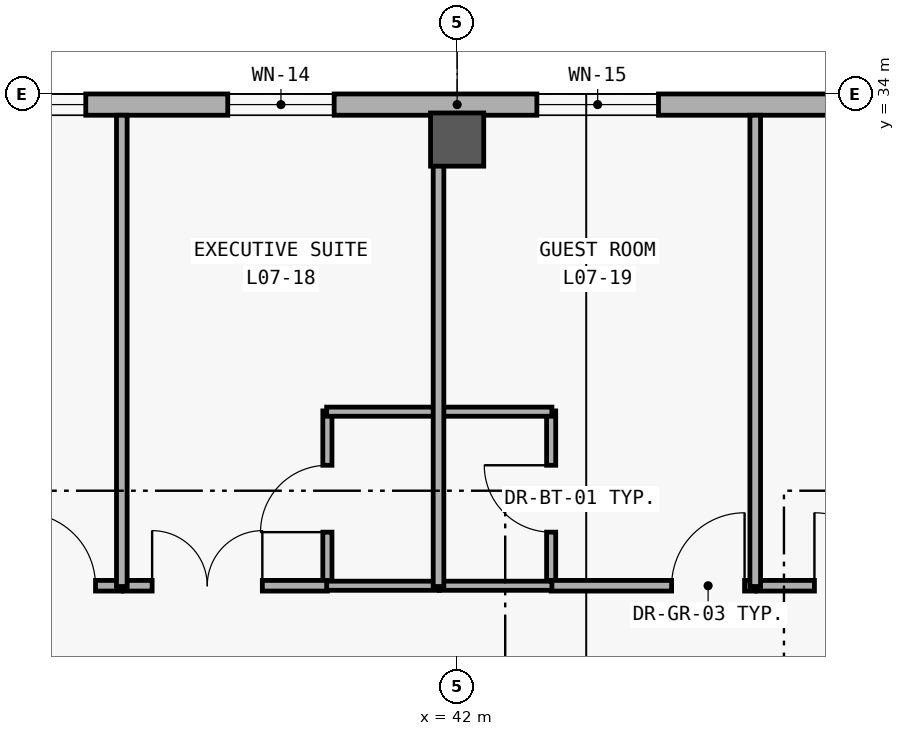
"""IFC4 building model, lengths in metres.
Left out: names, types, materials, properties, quantities, classifications, styles, units other than length and angle.
Written with IfcOpenShell. Run it as: python <this file> out.ifc"""

import sys

from ifc_helpers import new_model, si_unit, direction, frame, frame_2d, origin, origin_2d, place, context, subcontext, project, spatial, rectangle, extrude, element, fill, save


model = new_model("IFC4")
c1 = context("Model", 3, precision=1e-05, world=origin(), true_north=direction((0.0, 1.0)))
c2 = subcontext(c1, "Body", "Model", "MODEL_VIEW")
j1 = project(units=[si_unit("LENGTHUNIT", "METRE"), si_unit("PLANEANGLEUNIT", "RADIAN")], contexts=[c1])
p1 = place(None, origin())
s1 = spatial("IfcSite", under=j1, at=p1, CompositionType="ELEMENT")
p2 = place(p1, origin())
s2 = spatial("IfcBuilding", under=s1, at=p2, CompositionType="ELEMENT")
p3 = place(p2, frame((0.0, 0.0, 30.0)))
s3 = spatial("IfcBuildingStorey", under=s2, at=p3, CompositionType="ELEMENT", Elevation=30.0)
p4 = place(p3, frame((42.0, 33.4, 0.0), z_axis=(0.0, 0.0, 1.0), x_axis=(1.0, 0.0, 0.0)))
e1 = element("IfcColumn", 1, at=p4, inside=s3, PredefinedType="COLUMN", context=c2, shape_type="SweptSolid", body=[
    extrude(rectangle(XDim=0.7, YDim=0.7, at=origin_2d()), origin(), (0.0, 0.0, 1.0), 3.6),
])
p5 = place(p3, frame((8.68, 33.86, 0.0), z_axis=(0.0, 0.0, 1.0), x_axis=(1.0, 0.0, 0.0)))
e2 = element("IfcWall", 2, at=p5, inside=s3, PredefinedType="SOLIDWALL", context=c2, shape_type="SweptSolid", body=[
    extrude(rectangle(XDim=66.64, YDim=0.28, at=frame_2d((33.32, 0.0))), origin(), (0.0, 0.0, 1.0), 3.34),
])
p6 = place(p5, frame((5.195, 0.0, 0.85)))
e3 = element("IfcOpeningElement", 3, at=p6, cuts=e2, PredefinedType="OPENING", context=c2, shape_type="SweptSolid", body=[
    extrude(rectangle(XDim=2.0, YDim=1.65, at=frame_2d((1.0, 0.825))), frame((0.0, 0.15, 0.0), z_axis=(0.0, -1.0, 0.0), x_axis=(1.0, 0.0, 0.0)), (0.0, 0.0, 1.0), 0.3),
])
p7 = place(p5, frame((13.209, 0.0, 0.85)))
e4 = element("IfcOpeningElement", 4, at=p7, cuts=e2, PredefinedType="OPENING", context=c2, shape_type="SweptSolid", body=[
    extrude(rectangle(XDim=2.25, YDim=1.75, at=frame_2d((1.125, 0.875))), frame((0.0, 0.15, 0.0), z_axis=(0.0, -1.0, 0.0), x_axis=(1.0, 0.0, 0.0)), (0.0, 0.0, 1.0), 0.3),
])
p8 = place(p5, frame((17.226, 0.0, 0.85)))
e5 = element("IfcOpeningElement", 5, at=p8, cuts=e2, PredefinedType="OPENING", context=c2, shape_type="SweptSolid", body=[
    extrude(rectangle(XDim=2.55, YDim=1.8, at=frame_2d((1.275, 0.9))), frame((0.0, 0.15, 0.0), z_axis=(0.0, -1.0, 0.0), x_axis=(1.0, 0.0, 0.0)), (0.0, 0.0, 1.0), 0.3),
])
p9 = place(p5, frame((21.242, 0.0, 0.85)))
e6 = element("IfcOpeningElement", 6, at=p9, cuts=e2, PredefinedType="OPENING", context=c2, shape_type="SweptSolid", body=[
    extrude(rectangle(XDim=2.85, YDim=1.85, at=frame_2d((1.425, 0.925))), frame((0.0, 0.15, 0.0), z_axis=(0.0, -1.0, 0.0), x_axis=(1.0, 0.0, 0.0)), (0.0, 0.0, 1.0), 0.3),
])
p10 = place(p5, frame((25.234, 0.0, 0.85)))
e7 = element("IfcOpeningElement", 7, at=p10, cuts=e2, PredefinedType="OPENING", context=c2, shape_type="SweptSolid", body=[
    extrude(rectangle(XDim=3.2, YDim=1.95, at=frame_2d((1.6, 0.975))), frame((0.0, 0.15, 0.0), z_axis=(0.0, -1.0, 0.0), x_axis=(1.0, 0.0, 0.0)), (0.0, 0.0, 1.0), 0.3),
])
p11 = place(p5, frame((30.302, 0.0, 0.85)))
e8 = element("IfcOpeningElement", 8, at=p11, cuts=e2, PredefinedType="OPENING", context=c2, shape_type="SweptSolid", body=[
    extrude(rectangle(XDim=1.4, YDim=1.6, at=frame_2d((0.7, 0.8))), frame((0.0, 0.15, 0.0), z_axis=(0.0, -1.0, 0.0), x_axis=(1.0, 0.0, 0.0)), (0.0, 0.0, 1.0), 0.3),
])
p12 = place(p5, frame((34.369, 0.0, 0.85)))
e9 = element("IfcOpeningElement", 9, at=p12, cuts=e2, PredefinedType="OPENING", context=c2, shape_type="SweptSolid", body=[
    extrude(rectangle(XDim=1.6, YDim=1.6, at=frame_2d((0.8, 0.8))), frame((0.0, 0.15, 0.0), z_axis=(0.0, -1.0, 0.0), x_axis=(1.0, 0.0, 0.0)), (0.0, 0.0, 1.0), 0.3),
])
p13 = place(p5, frame((38.435, 0.0, 0.85)))
e10 = element("IfcOpeningElement", 10, at=p13, cuts=e2, PredefinedType="OPENING", context=c2, shape_type="SweptSolid", body=[
    extrude(rectangle(XDim=1.8, YDim=1.6, at=frame_2d((0.9, 0.8))), frame((0.0, 0.15, 0.0), z_axis=(0.0, -1.0, 0.0), x_axis=(1.0, 0.0, 0.0)), (0.0, 0.0, 1.0), 0.3),
])
p14 = place(p5, frame((42.502, 0.0, 0.85)))
e11 = element("IfcOpeningElement", 11, at=p14, cuts=e2, PredefinedType="OPENING", context=c2, shape_type="SweptSolid", body=[
    extrude(rectangle(XDim=2.0, YDim=1.65, at=frame_2d((1.0, 0.825))), frame((0.0, 0.15, 0.0), z_axis=(0.0, -1.0, 0.0), x_axis=(1.0, 0.0, 0.0)), (0.0, 0.0, 1.0), 0.3),
])
p15 = place(p5, frame((46.569, 0.0, 0.85)))
e12 = element("IfcOpeningElement", 12, at=p15, cuts=e2, PredefinedType="OPENING", context=c2, shape_type="SweptSolid", body=[
    extrude(rectangle(XDim=2.2, YDim=1.65, at=frame_2d((1.1, 0.825))), frame((0.0, 0.15, 0.0), z_axis=(0.0, -1.0, 0.0), x_axis=(1.0, 0.0, 0.0)), (0.0, 0.0, 1.0), 0.3),
])
p16 = place(p5, frame((50.536, 0.0, 0.85)))
e13 = element("IfcOpeningElement", 13, at=p16, cuts=e2, PredefinedType="OPENING", context=c2, shape_type="SweptSolid", body=[
    extrude(rectangle(XDim=2.6, YDim=2.2, at=frame_2d((1.3, 1.1))), frame((0.0, 0.15, 0.0), z_axis=(0.0, -1.0, 0.0), x_axis=(1.0, 0.0, 0.0)), (0.0, 0.0, 1.0), 0.3),
])
p17 = place(p5, frame((54.453, 0.0, 0.85)))
e14 = element("IfcOpeningElement", 14, at=p17, cuts=e2, PredefinedType="OPENING", context=c2, shape_type="SweptSolid", body=[
    extrude(rectangle(XDim=3.1, YDim=2.2, at=frame_2d((1.55, 1.1))), frame((0.0, 0.15, 0.0), z_axis=(0.0, -1.0, 0.0), x_axis=(1.0, 0.0, 0.0)), (0.0, 0.0, 1.0), 0.3),
])
p18 = place(p5, frame((59.545, 0.0, 0.85)))
e15 = element("IfcOpeningElement", 15, at=p18, cuts=e2, PredefinedType="OPENING", context=c2, shape_type="SweptSolid", body=[
    extrude(rectangle(XDim=1.25, YDim=1.45, at=frame_2d((0.625, 0.725))), frame((0.0, 0.15, 0.0), z_axis=(0.0, -1.0, 0.0), x_axis=(1.0, 0.0, 0.0)), (0.0, 0.0, 1.0), 0.3),
])
p19 = place(p5, frame((63.662, 0.0, 0.85)))
e16 = element("IfcOpeningElement", 16, at=p19, cuts=e2, PredefinedType="OPENING", context=c2, shape_type="SweptSolid", body=[
    extrude(rectangle(XDim=1.35, YDim=1.55, at=frame_2d((0.675, 0.775))), frame((0.0, 0.15, 0.0), z_axis=(0.0, -1.0, 0.0), x_axis=(1.0, 0.0, 0.0)), (0.0, 0.0, 1.0), 0.3),
])
p20 = place(p3, frame((40.293, 27.52, 0.0), z_axis=(0.0, 0.0, 1.0), x_axis=(0.0, 1.0, 0.0)))
e17 = element("IfcWall", 17, at=p20, inside=s3, PredefinedType="PARTITIONING", context=c2, shape_type="SweptSolid", body=[
    extrude(rectangle(XDim=2.31, YDim=0.12, at=frame_2d((1.155, 0.0))), origin(), (0.0, 0.0, 1.0), 2.48),
])
p21 = place(p20, frame((0.715, 0.0, 0.0)))
e18 = element("IfcOpeningElement", 18, at=p21, cuts=e17, PredefinedType="OPENING", context=c2, shape_type="SweptSolid", body=[
    extrude(rectangle(XDim=0.88, YDim=2.15, at=frame_2d((0.44, 1.075))), frame((0.0, 0.07, 0.0), z_axis=(0.0, -1.0, 0.0), x_axis=(1.0, 0.0, 0.0)), (0.0, 0.0, 1.0), 0.14),
])
p22 = place(p3, frame((43.237, 27.52, 0.0), z_axis=(0.0, 0.0, 1.0), x_axis=(0.0, 1.0, 0.0)))
e19 = element("IfcWall", 19, at=p22, inside=s3, PredefinedType="PARTITIONING", context=c2, shape_type="SweptSolid", body=[
    extrude(rectangle(XDim=2.31, YDim=0.12, at=frame_2d((1.155, 0.0))), origin(), (0.0, 0.0, 1.0), 2.48),
])
p23 = place(p22, frame((0.715, 0.0, 0.0)))
e20 = element("IfcOpeningElement", 20, at=p23, cuts=e19, PredefinedType="OPENING", context=c2, shape_type="SweptSolid", body=[
    extrude(rectangle(XDim=0.88, YDim=2.15, at=frame_2d((0.44, 1.075))), frame((0.0, 0.07, 0.0), z_axis=(0.0, -1.0, 0.0), x_axis=(1.0, 0.0, 0.0)), (0.0, 0.0, 1.0), 0.14),
])
p24 = place(p3, frame((34.903, 27.53, 0.0), z_axis=(0.0, 0.0, 1.0), x_axis=(1.0, 0.0, 0.0)))
e21 = element("IfcWall", 21, at=p24, inside=s3, PredefinedType="PARTITIONING", context=c2, shape_type="SweptSolid", body=[
    extrude(rectangle(XDim=2.685, YDim=0.14, at=frame_2d((1.342, 0.0))), origin(), (0.0, 0.0, 1.0), 2.48),
])
p25 = place(p24, frame((1.379, 0.0, 0.0)))
e22 = element("IfcOpeningElement", 22, at=p25, cuts=e21, PredefinedType="OPENING", context=c2, shape_type="SweptSolid", body=[
    extrude(rectangle(XDim=0.96, YDim=2.25, at=frame_2d((0.48, 1.125))), frame((0.0, 0.08, 0.0), z_axis=(0.0, -1.0, 0.0), x_axis=(1.0, 0.0, 0.0)), (0.0, 0.0, 1.0), 0.16),
])
p26 = place(p3, frame((37.608, 27.53, 0.0), z_axis=(0.0, 0.0, 1.0), x_axis=(1.0, 0.0, 0.0)))
e23 = element("IfcWall", 23, at=p26, inside=s3, PredefinedType="PARTITIONING", context=c2, shape_type="SweptSolid", body=[
    extrude(rectangle(XDim=2.685, YDim=0.14, at=frame_2d((1.343, 0.0))), origin(), (0.0, 0.0, 1.0), 2.48),
])
p27 = place(p26, frame((0.379, 0.0, 0.0)))
e24 = element("IfcOpeningElement", 24, at=p27, cuts=e23, PredefinedType="OPENING", context=c2, shape_type="SweptSolid", body=[
    extrude(rectangle(XDim=1.45, YDim=2.3, at=frame_2d((0.725, 1.15))), frame((0.0, 0.08, 0.0), z_axis=(0.0, -1.0, 0.0), x_axis=(1.0, 0.0, 0.0)), (0.0, 0.0, 1.0), 0.16),
])
p28 = place(p3, frame((43.237, 27.53, 0.0), z_axis=(0.0, 0.0, 1.0), x_axis=(1.0, 0.0, 0.0)))
e25 = element("IfcWall", 25, at=p28, inside=s3, PredefinedType="PARTITIONING", context=c2, shape_type="SweptSolid", body=[
    extrude(rectangle(XDim=2.685, YDim=0.14, at=frame_2d((1.343, 0.0))), origin(), (0.0, 0.0, 1.0), 2.48),
])
p29 = place(p28, frame((1.585, 0.0, 0.0)))
e26 = element("IfcOpeningElement", 26, at=p29, cuts=e25, PredefinedType="OPENING", context=c2, shape_type="SweptSolid", body=[
    extrude(rectangle(XDim=0.96, YDim=2.25, at=frame_2d((0.48, 1.125))), frame((0.0, 0.08, 0.0), z_axis=(0.0, -1.0, 0.0), x_axis=(1.0, 0.0, 0.0)), (0.0, 0.0, 1.0), 0.16),
])
p30 = place(p3, frame((45.942, 27.53, 0.0), z_axis=(0.0, 0.0, 1.0), x_axis=(1.0, 0.0, 0.0)))
e27 = element("IfcWall", 27, at=p30, inside=s3, PredefinedType="PARTITIONING", context=c2, shape_type="SweptSolid", body=[
    extrude(rectangle(XDim=2.684, YDim=0.14, at=frame_2d((1.342, 0.0))), origin(), (0.0, 0.0, 1.0), 2.48),
])
p31 = place(p30, frame((0.759, 0.0, 0.0)))
e28 = element("IfcOpeningElement", 28, at=p31, cuts=e27, PredefinedType="OPENING", context=c2, shape_type="SweptSolid", body=[
    extrude(rectangle(XDim=0.96, YDim=2.25, at=frame_2d((0.48, 1.125))), frame((0.0, 0.08, 0.0), z_axis=(0.0, -1.0, 0.0), x_axis=(1.0, 0.0, 0.0)), (0.0, 0.0, 1.0), 0.16),
])
for number, where, z_axis, x_axis in (
    (29, (40.283, 27.53, 0.0), (0.0, 0.0, 1.0), (1.0, 0.0, 0.0)),
    (30, (40.283, 29.82, 0.0), (0.0, 0.0, 1.0), (1.0, 0.0, 0.0)),
):
    element("IfcWall", number, at=place(p3, frame(where, z_axis=z_axis, x_axis=x_axis)), inside=s3, PredefinedType="PARTITIONING", context=c2, shape_type="SweptSolid", body=[
        extrude(rectangle(XDim=1.482, YDim=0.12, at=frame_2d((0.741, 0.0))), origin(), (0.0, 0.0, 1.0), 2.48),
    ])
for number, where, z_axis, x_axis in (
    (31, (41.765, 27.53, 0.0), (0.0, 0.0, 1.0), (1.0, 0.0, 0.0)),
    (32, (41.765, 29.82, 0.0), (0.0, 0.0, 1.0), (1.0, 0.0, 0.0)),
):
    element("IfcWall", number, at=place(p3, frame(where, z_axis=z_axis, x_axis=x_axis)), inside=s3, PredefinedType="PARTITIONING", context=c2, shape_type="SweptSolid", body=[
        extrude(rectangle(XDim=1.482, YDim=0.12, at=frame_2d((0.741, 0.0))), origin(), (0.0, 0.0, 1.0), 2.48),
    ])
for number, where, z_axis, x_axis in (
    (33, (37.588, 27.52, 0.0), (0.0, 0.0, 1.0), (0.0, 1.0, 0.0)),
    (34, (41.755, 27.52, 0.0), (0.0, 0.0, 1.0), (0.0, 1.0, 0.0)),
    (35, (45.922, 27.52, 0.0), (0.0, 0.0, 1.0), (0.0, 1.0, 0.0)),
):
    element("IfcWall", number, at=place(p3, frame(where, z_axis=z_axis, x_axis=x_axis)), inside=s3, PredefinedType="PARTITIONING", context=c2, shape_type="SweptSolid", body=[
        extrude(rectangle(XDim=6.2, YDim=0.14, at=frame_2d((3.1, 0.0))), origin(), (0.0, 0.0, 1.0), 2.48),
    ])
p32 = place(p10, origin())
e36 = element("IfcWindow", 36, at=p32, inside=s3, PartitioningType="SINGLE_PANEL", PredefinedType="WINDOW", context=c2, shape_type="SweptSolid", body=[
    extrude(rectangle(XDim=3.2, YDim=1.95, at=frame_2d((1.6, 0.975))), frame((0.0, 0.03, 0.0), z_axis=(0.0, -1.0, 0.0), x_axis=(1.0, 0.0, 0.0)), (0.0, 0.0, 1.0), 0.06),
])
fill(e7, e36)
p33 = place(p11, origin())
e37 = element("IfcWindow", 37, at=p33, inside=s3, PartitioningType="SINGLE_PANEL", PredefinedType="WINDOW", context=c2, shape_type="SweptSolid", body=[
    extrude(rectangle(XDim=1.4, YDim=1.6, at=frame_2d((0.7, 0.8))), frame((0.0, 0.03, 0.0), z_axis=(0.0, -1.0, 0.0), x_axis=(1.0, 0.0, 0.0)), (0.0, 0.0, 1.0), 0.06),
])
fill(e8, e37)
p34 = place(p12, origin())
e38 = element("IfcWindow", 38, at=p34, inside=s3, PartitioningType="SINGLE_PANEL", PredefinedType="WINDOW", context=c2, shape_type="SweptSolid", body=[
    extrude(rectangle(XDim=1.6, YDim=1.6, at=frame_2d((0.8, 0.8))), frame((0.0, 0.03, 0.0), z_axis=(0.0, -1.0, 0.0), x_axis=(1.0, 0.0, 0.0)), (0.0, 0.0, 1.0), 0.06),
])
fill(e9, e38)
p35 = place(p21, origin())
e39 = element("IfcDoor", 39, at=p35, inside=s3, OperationType="SINGLE_SWING_LEFT", PredefinedType="DOOR", context=c2, shape_type="SweptSolid", body=[
    extrude(rectangle(XDim=0.88, YDim=2.15, at=frame_2d((0.44, 1.075))), frame((0.0, 0.025, 0.0), z_axis=(0.0, -1.0, 0.0), x_axis=(1.0, 0.0, 0.0)), (0.0, 0.0, 1.0), 0.05),
])
fill(e18, e39)
p36 = place(p23, origin())
e40 = element("IfcDoor", 40, at=p36, inside=s3, OperationType="SINGLE_SWING_RIGHT", PredefinedType="DOOR", context=c2, shape_type="SweptSolid", body=[
    extrude(rectangle(XDim=0.88, YDim=2.15, at=frame_2d((0.44, 1.075))), frame((0.0, 0.025, 0.0), z_axis=(0.0, -1.0, 0.0), x_axis=(1.0, 0.0, 0.0)), (0.0, 0.0, 1.0), 0.05),
])
fill(e20, e40)
p37 = place(p25, origin())
e41 = element("IfcDoor", 41, at=p37, inside=s3, OperationType="SINGLE_SWING_LEFT", PredefinedType="DOOR", context=c2, shape_type="SweptSolid", body=[
    extrude(rectangle(XDim=0.96, YDim=2.25, at=frame_2d((0.48, 1.125))), frame((0.0, 0.025, 0.0), z_axis=(0.0, -1.0, 0.0), x_axis=(1.0, 0.0, 0.0)), (0.0, 0.0, 1.0), 0.05),
])
fill(e22, e41)
p38 = place(p27, origin())
e42 = element("IfcDoor", 42, at=p38, inside=s3, OperationType="DOUBLE_DOOR_SINGLE_SWING", PredefinedType="DOOR", context=c2, shape_type="SweptSolid", body=[
    extrude(rectangle(XDim=1.45, YDim=2.3, at=frame_2d((0.725, 1.15))), frame((0.0, 0.025, 0.0), z_axis=(0.0, -1.0, 0.0), x_axis=(1.0, 0.0, 0.0)), (0.0, 0.0, 1.0), 0.05),
])
fill(e24, e42)
p39 = place(p29, origin())
e43 = element("IfcDoor", 43, at=p39, inside=s3, OperationType="SINGLE_SWING_RIGHT", PredefinedType="DOOR", context=c2, shape_type="SweptSolid", body=[
    extrude(rectangle(XDim=0.96, YDim=2.25, at=frame_2d((0.48, 1.125))), frame((0.0, 0.025, 0.0), z_axis=(0.0, -1.0, 0.0), x_axis=(1.0, 0.0, 0.0)), (0.0, 0.0, 1.0), 0.05),
])
fill(e26, e43)
p40 = place(p31, origin())
e44 = element("IfcDoor", 44, at=p40, inside=s3, OperationType="SINGLE_SWING_LEFT", PredefinedType="DOOR", context=c2, shape_type="SweptSolid", body=[
    extrude(rectangle(XDim=0.96, YDim=2.25, at=frame_2d((0.48, 1.125))), frame((0.0, 0.025, 0.0), z_axis=(0.0, -1.0, 0.0), x_axis=(1.0, 0.0, 0.0)), (0.0, 0.0, 1.0), 0.05),
])
fill(e28, e44)
save(model, sys.argv[1])
